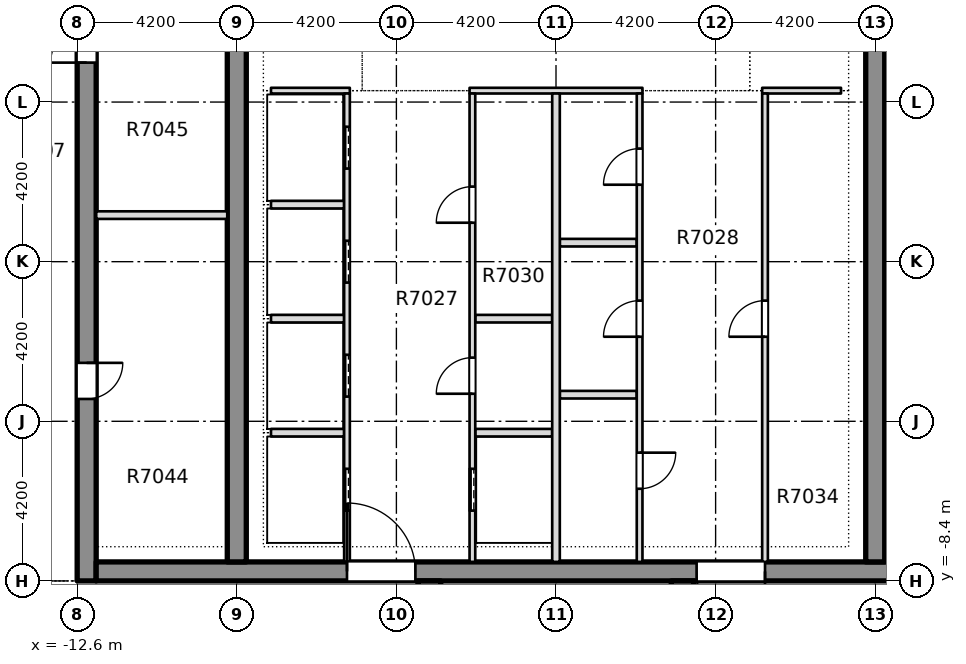
"""IFC4 building model, lengths in metres.
Left out: names, types, materials, properties, quantities, classifications, styles, units other than length and angle.
Written with IfcOpenShell. Run it as: python <this file> out.ifc"""

import sys

from ifc_helpers import new_model, si_unit, direction, frame, frame_2d, origin, place, context, subcontext, project, spatial, rectangle, extrude, element, fill, save


model = new_model("IFC4")
c1 = context("Model", 3, precision=1e-05, world=origin(), true_north=direction((0.0, 1.0)))
c2 = subcontext(c1, "Body", "Model", "MODEL_VIEW")
j1 = project(units=[si_unit("LENGTHUNIT", "METRE"), si_unit("PLANEANGLEUNIT", "RADIAN")], contexts=[c1])
p1 = place(None, origin())
s1 = spatial("IfcSite", under=j1, at=p1, CompositionType="ELEMENT")
p2 = place(p1, origin())
s2 = spatial("IfcBuilding", under=s1, at=p2, CompositionType="ELEMENT")
p3 = place(p2, frame((0.0, 0.0, 264.85)))
s3 = spatial("IfcBuildingStorey", under=s2, at=p3, CompositionType="ELEMENT", Elevation=264.85)
p4 = place(p3, frame((-12.35, -8.4, -0.5), z_axis=(0.0, 0.0, 1.0), x_axis=(0.0, 1.0, 0.0)))
e1 = element("IfcWall", 1, at=p4, inside=s3, PredefinedType="SHEAR", context=c2, shape_type="SweptSolid", body=[
    extrude(rectangle(XDim=30.15, YDim=0.5, at=frame_2d((15.075, 0.0))), origin(), (0.0, 0.0, 1.0), 4.5),
])
p5 = place(p4, frame((4.788, 0.0, 0.5)))
e2 = element("IfcOpeningElement", 2, at=p5, cuts=e1, PredefinedType="OPENING", context=c2, shape_type="SweptSolid", body=[
    extrude(rectangle(XDim=0.95, YDim=2.1, at=frame_2d((0.475, 1.05))), frame((0.0, 0.26, 0.0), z_axis=(0.0, -1.0, 0.0), x_axis=(1.0, 0.0, 0.0)), (0.0, 0.0, 1.0), 0.52),
])
p6 = place(p4, frame((13.638, 0.0, 0.5)))
e3 = element("IfcOpeningElement", 3, at=p6, cuts=e1, PredefinedType="OPENING", context=c2, shape_type="SweptSolid", body=[
    extrude(rectangle(XDim=0.95, YDim=2.1, at=frame_2d((0.475, 1.05))), frame((0.0, 0.26, 0.0), z_axis=(0.0, -1.0, 0.0), x_axis=(1.0, 0.0, 0.0)), (0.0, 0.0, 1.0), 0.52),
])
p7 = place(p4, frame((21.771, 0.0, 0.5)))
e4 = element("IfcOpeningElement", 4, at=p7, cuts=e1, PredefinedType="OPENING", context=c2, shape_type="SweptSolid", body=[
    extrude(rectangle(XDim=0.95, YDim=2.1, at=frame_2d((0.475, 1.05))), frame((0.0, 0.26, 0.0), z_axis=(0.0, -1.0, 0.0), x_axis=(1.0, 0.0, 0.0)), (0.0, 0.0, 1.0), 0.52),
])
p8 = place(p4, frame((24.576, 0.0, 0.5)))
e5 = element("IfcOpeningElement", 5, at=p8, cuts=e1, PredefinedType="OPENING", context=c2, shape_type="SweptSolid", body=[
    extrude(rectangle(XDim=0.95, YDim=2.1, at=frame_2d((0.475, 1.05))), frame((0.0, 0.26, 0.0), z_axis=(0.0, -1.0, 0.0), x_axis=(1.0, 0.0, 0.0)), (0.0, 0.0, 1.0), 0.52),
])
p9 = place(p4, frame((27.555, 0.0, 0.5)))
e6 = element("IfcOpeningElement", 6, at=p9, cuts=e1, PredefinedType="OPENING", context=c2, shape_type="SweptSolid", body=[
    extrude(rectangle(XDim=0.95, YDim=2.1, at=frame_2d((0.475, 1.05))), frame((0.0, 0.26, 0.0), z_axis=(0.0, -1.0, 0.0), x_axis=(1.0, 0.0, 0.0)), (0.0, 0.0, 1.0), 0.52),
])
p10 = place(p4, frame((19.3, 0.0, 0.5)))
e7 = element("IfcOpeningElement", 7, at=p10, cuts=e1, PredefinedType="OPENING", context=c2, shape_type="SweptSolid", body=[
    extrude(rectangle(XDim=1.2, YDim=2.1, at=frame_2d((0.6, 1.05))), frame((0.0, 0.26, 0.0), z_axis=(0.0, -1.0, 0.0), x_axis=(1.0, 0.0, 0.0)), (0.0, 0.0, 1.0), 0.52),
])
p11 = place(p3, frame((-12.1, -8.15, -0.5), z_axis=(0.0, 0.0, 1.0), x_axis=(1.0, 0.0, 0.0)))
e8 = element("IfcWall", 8, at=p11, inside=s3, PredefinedType="SHEAR", context=c2, shape_type="SweptSolid", body=[
    extrude(rectangle(XDim=24.2, YDim=0.5, at=frame_2d((12.1, 0.0))), origin(), (0.0, 0.0, 1.0), 4.5),
])
p12 = place(p11, frame((6.6, 0.0, 0.5)))
e9 = element("IfcOpeningElement", 9, at=p12, cuts=e8, PredefinedType="OPENING", context=c2, shape_type="SweptSolid", body=[
    extrude(rectangle(XDim=1.8, YDim=2.1, at=frame_2d((0.9, 1.05))), frame((0.0, 0.26, 0.0), z_axis=(0.0, -1.0, 0.0), x_axis=(1.0, 0.0, 0.0)), (0.0, 0.0, 1.0), 0.52),
])
p13 = place(p11, frame((15.8, 0.0, 0.5)))
e10 = element("IfcOpeningElement", 10, at=p13, cuts=e8, PredefinedType="OPENING", context=c2, shape_type="SweptSolid", body=[
    extrude(rectangle(XDim=1.8, YDim=2.1, at=frame_2d((0.9, 1.05))), frame((0.0, 0.26, 0.0), z_axis=(0.0, -1.0, 0.0), x_axis=(1.0, 0.0, 0.0)), (0.0, 0.0, 1.0), 0.52),
])
p14 = place(p3, frame((-8.4, -7.9, -0.5), z_axis=(0.0, 0.0, 1.0), x_axis=(0.0, 1.0, 0.0)))
e11 = element("IfcWall", 11, at=p14, inside=s3, PredefinedType="SHEAR", context=c2, shape_type="SweptSolid", body=[
    extrude(rectangle(XDim=29.15, YDim=0.5, at=frame_2d((14.575, 0.0))), origin(), (0.0, 0.0, 1.0), 4.5),
])
p15 = place(p14, frame((18.8, 0.0, 0.5)))
e12 = element("IfcOpeningElement", 12, at=p15, cuts=e11, PredefinedType="OPENING", context=c2, shape_type="SweptSolid", body=[
    extrude(rectangle(XDim=1.2, YDim=2.1, at=frame_2d((0.6, 1.05))), frame((0.0, 0.26, 0.0), z_axis=(0.0, -1.0, 0.0), x_axis=(1.0, 0.0, 0.0)), (0.0, 0.0, 1.0), 0.52),
])
p16 = place(p3, frame((8.4, -7.9, -0.5), z_axis=(0.0, 0.0, 1.0), x_axis=(0.0, 1.0, 0.0)))
e13 = element("IfcWall", 13, at=p16, inside=s3, PredefinedType="SHEAR", context=c2, shape_type="SweptSolid", body=[
    extrude(rectangle(XDim=29.15, YDim=0.5, at=frame_2d((14.575, 0.0))), origin(), (0.0, 0.0, 1.0), 4.5),
])
p17 = place(p16, frame((18.8, 0.0, 0.5)))
e14 = element("IfcOpeningElement", 14, at=p17, cuts=e13, PredefinedType="OPENING", context=c2, shape_type="SweptSolid", body=[
    extrude(rectangle(XDim=1.2, YDim=2.1, at=frame_2d((0.6, 1.05))), frame((0.0, 0.26, 0.0), z_axis=(0.0, -1.0, 0.0), x_axis=(1.0, 0.0, 0.0)), (0.0, 0.0, 1.0), 0.52),
])
for number, where, z_axis, x_axis in (
    (15, (-3.333, -13.0, 0.0), (0.0, 0.0, 1.0), (0.0, 1.0, 0.0)),
    (16, (3.333, -13.0, 0.0), (0.0, 0.0, 1.0), (0.0, 1.0, 0.0)),
):
    element("IfcWall", number, at=place(p3, frame(where, z_axis=z_axis, x_axis=x_axis)), inside=s3, PredefinedType="SOLIDWALL", context=c2, shape_type="SweptSolid", body=[
        extrude(rectangle(XDim=4.6, YDim=0.6, at=frame_2d((2.3, 0.0))), origin(), (0.0, 0.0, 1.0), 4.0),
    ])
p18 = place(p3, frame((-7.5, -4.5, 0.0), z_axis=(0.0, 0.0, 1.0), x_axis=(1.0, 0.0, 0.0)))
e17 = element("IfcWall", 17, at=p18, inside=s3, PredefinedType="PARTITIONING", context=c2, shape_type="SweptSolid", body=[
    extrude(rectangle(XDim=1.925, YDim=0.2, at=frame_2d((0.962, 0.0))), origin(), (0.0, 0.0, 1.0), 4.0),
])
for number, where, z_axis, x_axis in (
    (18, (-2.125, -4.5, 0.0), (0.0, 0.0, 1.0), (1.0, 0.0, 0.0)),
    (19, (0.1, -3.5, 0.0), (0.0, 0.0, 1.0), (1.0, 0.0, 0.0)),
):
    element("IfcWall", number, at=place(p3, frame(where, z_axis=z_axis, x_axis=x_axis)), inside=s3, PredefinedType="PARTITIONING", context=c2, shape_type="SweptSolid", body=[
        extrude(rectangle(XDim=2.025, YDim=0.2, at=frame_2d((1.012, 0.0))), origin(), (0.0, 0.0, 1.0), 4.0),
    ])
p19 = place(p3, frame((-7.5, -1.5, 0.0), z_axis=(0.0, 0.0, 1.0), x_axis=(1.0, 0.0, 0.0)))
e20 = element("IfcWall", 20, at=p19, inside=s3, PredefinedType="PARTITIONING", context=c2, shape_type="SweptSolid", body=[
    extrude(rectangle(XDim=1.925, YDim=0.2, at=frame_2d((0.962, 0.0))), origin(), (0.0, 0.0, 1.0), 4.0),
])
for number, where, z_axis, x_axis in (
    (21, (-2.125, -1.5, 0.0), (0.0, 0.0, 1.0), (1.0, 0.0, 0.0)),
    (22, (0.1, 0.5, 0.0), (0.0, 0.0, 1.0), (1.0, 0.0, 0.0)),
):
    element("IfcWall", number, at=place(p3, frame(where, z_axis=z_axis, x_axis=x_axis)), inside=s3, PredefinedType="PARTITIONING", context=c2, shape_type="SweptSolid", body=[
        extrude(rectangle(XDim=2.025, YDim=0.2, at=frame_2d((1.012, 0.0))), origin(), (0.0, 0.0, 1.0), 4.0),
    ])
p20 = place(p3, frame((-7.5, 1.5, 0.0), z_axis=(0.0, 0.0, 1.0), x_axis=(1.0, 0.0, 0.0)))
e23 = element("IfcWall", 23, at=p20, inside=s3, PredefinedType="PARTITIONING", context=c2, shape_type="SweptSolid", body=[
    extrude(rectangle(XDim=1.925, YDim=0.2, at=frame_2d((0.962, 0.0))), origin(), (0.0, 0.0, 1.0), 4.0),
])
p21 = place(p3, frame((-7.5, 4.5, 0.0), z_axis=(0.0, 0.0, 1.0), x_axis=(1.0, 0.0, 0.0)))
e24 = element("IfcWall", 24, at=p21, inside=s3, PredefinedType="PARTITIONING", context=c2, shape_type="SweptSolid", body=[
    extrude(rectangle(XDim=2.075, YDim=0.15, at=frame_2d((1.038, 0.0))), origin(), (0.0, 0.0, 1.0), 2.5),
])
p22 = place(p3, frame((-2.275, 4.5, 0.0), z_axis=(0.0, 0.0, 1.0), x_axis=(1.0, 0.0, 0.0)))
e25 = element("IfcWall", 25, at=p22, inside=s3, PredefinedType="PARTITIONING", context=c2, shape_type="SweptSolid", body=[
    extrude(rectangle(XDim=4.55, YDim=0.15, at=frame_2d((2.275, 0.0))), origin(), (0.0, 0.0, 1.0), 2.5),
])
p23 = place(p3, frame((5.425, 4.5, 0.0), z_axis=(0.0, 0.0, 1.0), x_axis=(1.0, 0.0, 0.0)))
e26 = element("IfcWall", 26, at=p23, inside=s3, PredefinedType="PARTITIONING", context=c2, shape_type="SweptSolid", body=[
    extrude(rectangle(XDim=2.075, YDim=0.15, at=frame_2d((1.038, 0.0))), origin(), (0.0, 0.0, 1.0), 2.5),
])
p24 = place(p3, frame((-5.5, -7.899, 0.0), z_axis=(0.0, 0.0, 1.0), x_axis=(0.0, 1.0, 0.0)))
e27 = element("IfcWall", 27, at=p24, inside=s3, PredefinedType="PARTITIONING", context=c2, shape_type="SweptSolid", body=[
    extrude(rectangle(XDim=12.324, YDim=0.15, at=frame_2d((6.162, 0.0))), origin(), (0.0, 0.0, 1.0), 4.0),
])
p25 = place(p24, frame((1.349, 0.0, 0.0)))
e28 = element("IfcOpeningElement", 28, at=p25, cuts=e27, PredefinedType="OPENING", context=c2, shape_type="SweptSolid", body=[
    extrude(rectangle(XDim=1.1, YDim=2.1, at=frame_2d((0.55, 1.05))), frame((0.0, 0.085, 0.0), z_axis=(0.0, -1.0, 0.0), x_axis=(1.0, 0.0, 0.0)), (0.0, 0.0, 1.0), 0.17),
])
p26 = place(p24, frame((4.349, 0.0, 0.0)))
e29 = element("IfcOpeningElement", 29, at=p26, cuts=e27, PredefinedType="OPENING", context=c2, shape_type="SweptSolid", body=[
    extrude(rectangle(XDim=1.1, YDim=2.1, at=frame_2d((0.55, 1.05))), frame((0.0, 0.085, 0.0), z_axis=(0.0, -1.0, 0.0), x_axis=(1.0, 0.0, 0.0)), (0.0, 0.0, 1.0), 0.17),
])
p27 = place(p24, frame((7.349, 0.0, 0.0)))
e30 = element("IfcOpeningElement", 30, at=p27, cuts=e27, PredefinedType="OPENING", context=c2, shape_type="SweptSolid", body=[
    extrude(rectangle(XDim=1.1, YDim=2.1, at=frame_2d((0.55, 1.05))), frame((0.0, 0.085, 0.0), z_axis=(0.0, -1.0, 0.0), x_axis=(1.0, 0.0, 0.0)), (0.0, 0.0, 1.0), 0.17),
])
p28 = place(p24, frame((10.349, 0.0, 0.0)))
e31 = element("IfcOpeningElement", 31, at=p28, cuts=e27, PredefinedType="OPENING", context=c2, shape_type="SweptSolid", body=[
    extrude(rectangle(XDim=1.1, YDim=2.1, at=frame_2d((0.55, 1.05))), frame((0.0, 0.085, 0.0), z_axis=(0.0, -1.0, 0.0), x_axis=(1.0, 0.0, 0.0)), (0.0, 0.0, 1.0), 0.17),
])
p29 = place(p3, frame((-2.2, -7.899, 0.0), z_axis=(0.0, 0.0, 1.0), x_axis=(0.0, 1.0, 0.0)))
e32 = element("IfcWall", 32, at=p29, inside=s3, PredefinedType="PARTITIONING", context=c2, shape_type="SweptSolid", body=[
    extrude(rectangle(XDim=12.324, YDim=0.15, at=frame_2d((6.162, 0.0))), origin(), (0.0, 0.0, 1.0), 4.0),
])
p30 = place(p29, frame((1.349, 0.0, 0.0)))
e33 = element("IfcOpeningElement", 33, at=p30, cuts=e32, PredefinedType="OPENING", context=c2, shape_type="SweptSolid", body=[
    extrude(rectangle(XDim=1.1, YDim=2.1, at=frame_2d((0.55, 1.05))), frame((0.0, 0.085, 0.0), z_axis=(0.0, -1.0, 0.0), x_axis=(1.0, 0.0, 0.0)), (0.0, 0.0, 1.0), 0.17),
])
p31 = place(p29, frame((4.424, 0.0, 0.0)))
e34 = element("IfcOpeningElement", 34, at=p31, cuts=e32, PredefinedType="OPENING", context=c2, shape_type="SweptSolid", body=[
    extrude(rectangle(XDim=0.95, YDim=2.1, at=frame_2d((0.475, 1.05))), frame((0.0, 0.085, 0.0), z_axis=(0.0, -1.0, 0.0), x_axis=(1.0, 0.0, 0.0)), (0.0, 0.0, 1.0), 0.17),
])
p32 = place(p29, frame((8.924, 0.0, 0.0)))
e35 = element("IfcOpeningElement", 35, at=p32, cuts=e32, PredefinedType="OPENING", context=c2, shape_type="SweptSolid", body=[
    extrude(rectangle(XDim=0.95, YDim=2.1, at=frame_2d((0.475, 1.05))), frame((0.0, 0.085, 0.0), z_axis=(0.0, -1.0, 0.0), x_axis=(1.0, 0.0, 0.0)), (0.0, 0.0, 1.0), 0.17),
])
p33 = place(p3, frame((0.0, -7.899, 0.0), z_axis=(0.0, 0.0, 1.0), x_axis=(0.0, 1.0, 0.0)))
e36 = element("IfcWall", 36, at=p33, inside=s3, PredefinedType="PARTITIONING", context=c2, shape_type="SweptSolid", body=[
    extrude(rectangle(XDim=12.324, YDim=0.2, at=frame_2d((6.162, 0.0))), origin(), (0.0, 0.0, 1.0), 4.0),
])
p34 = place(p3, frame((2.2, -7.899, 0.0), z_axis=(0.0, 0.0, 1.0), x_axis=(0.0, 1.0, 0.0)))
e37 = element("IfcWall", 37, at=p34, inside=s3, PredefinedType="PARTITIONING", context=c2, shape_type="SweptSolid", body=[
    extrude(rectangle(XDim=12.324, YDim=0.15, at=frame_2d((6.162, 0.0))), origin(), (0.0, 0.0, 1.0), 4.0),
])
p35 = place(p34, frame((1.924, 0.0, 0.0)))
e38 = element("IfcOpeningElement", 38, at=p35, cuts=e37, PredefinedType="OPENING", context=c2, shape_type="SweptSolid", body=[
    extrude(rectangle(XDim=0.95, YDim=2.1, at=frame_2d((0.475, 1.05))), frame((0.0, 0.085, 0.0), z_axis=(0.0, -1.0, 0.0), x_axis=(1.0, 0.0, 0.0)), (0.0, 0.0, 1.0), 0.17),
])
p36 = place(p34, frame((5.924, 0.0, 0.0)))
e39 = element("IfcOpeningElement", 39, at=p36, cuts=e37, PredefinedType="OPENING", context=c2, shape_type="SweptSolid", body=[
    extrude(rectangle(XDim=0.95, YDim=2.1, at=frame_2d((0.475, 1.05))), frame((0.0, 0.085, 0.0), z_axis=(0.0, -1.0, 0.0), x_axis=(1.0, 0.0, 0.0)), (0.0, 0.0, 1.0), 0.17),
])
p37 = place(p34, frame((9.924, 0.0, 0.0)))
e40 = element("IfcOpeningElement", 40, at=p37, cuts=e37, PredefinedType="OPENING", context=c2, shape_type="SweptSolid", body=[
    extrude(rectangle(XDim=0.95, YDim=2.1, at=frame_2d((0.475, 1.05))), frame((0.0, 0.085, 0.0), z_axis=(0.0, -1.0, 0.0), x_axis=(1.0, 0.0, 0.0)), (0.0, 0.0, 1.0), 0.17),
])
p38 = place(p3, frame((5.5, -7.899, 0.0), z_axis=(0.0, 0.0, 1.0), x_axis=(0.0, 1.0, 0.0)))
e41 = element("IfcWall", 41, at=p38, inside=s3, PredefinedType="PARTITIONING", context=c2, shape_type="SweptSolid", body=[
    extrude(rectangle(XDim=12.324, YDim=0.15, at=frame_2d((6.162, 0.0))), origin(), (0.0, 0.0, 1.0), 4.0),
])
p39 = place(p38, frame((5.924, 0.0, 0.0)))
e42 = element("IfcOpeningElement", 42, at=p39, cuts=e41, PredefinedType="OPENING", context=c2, shape_type="SweptSolid", body=[
    extrude(rectangle(XDim=0.95, YDim=2.1, at=frame_2d((0.475, 1.05))), frame((0.0, 0.085, 0.0), z_axis=(0.0, -1.0, 0.0), x_axis=(1.0, 0.0, 0.0)), (0.0, 0.0, 1.0), 0.17),
])
for number, where, z_axis, x_axis in (
    (43, (-12.099, 1.225, 0.0), (0.0, 0.0, 1.0), (1.0, 0.0, 0.0)),
    (44, (8.651, -1.519, 0.0), (0.0, 0.0, 1.0), (1.0, 0.0, 0.0)),
    (45, (8.651, 1.533, 0.0), (0.0, 0.0, 1.0), (1.0, 0.0, 0.0)),
):
    element("IfcWall", number, at=place(p3, frame(where, z_axis=z_axis, x_axis=x_axis)), inside=s3, PredefinedType="PARTITIONING", context=c2, shape_type="SweptSolid", body=[
        extrude(rectangle(XDim=3.448, YDim=0.2, at=frame_2d((1.724, 0.0))), origin(), (0.0, 0.0, 1.0), 4.0),
    ])
p40 = place(p25, origin())
e46 = element("IfcDoor", 46, at=p40, inside=s3, OperationType="SLIDING_TO_LEFT", PredefinedType="DOOR", context=c2, shape_type="SweptSolid", body=[
    extrude(rectangle(XDim=1.1, YDim=2.1, at=frame_2d((0.55, 1.05))), frame((0.0, 0.025, 0.0), z_axis=(0.0, -1.0, 0.0), x_axis=(1.0, 0.0, 0.0)), (0.0, 0.0, 1.0), 0.05),
])
fill(e28, e46)
p41 = place(p26, origin())
e47 = element("IfcDoor", 47, at=p41, inside=s3, OperationType="SLIDING_TO_LEFT", PredefinedType="DOOR", context=c2, shape_type="SweptSolid", body=[
    extrude(rectangle(XDim=1.1, YDim=2.1, at=frame_2d((0.55, 1.05))), frame((0.0, 0.025, 0.0), z_axis=(0.0, -1.0, 0.0), x_axis=(1.0, 0.0, 0.0)), (0.0, 0.0, 1.0), 0.05),
])
fill(e29, e47)
p42 = place(p27, origin())
e48 = element("IfcDoor", 48, at=p42, inside=s3, OperationType="SLIDING_TO_LEFT", PredefinedType="DOOR", context=c2, shape_type="SweptSolid", body=[
    extrude(rectangle(XDim=1.1, YDim=2.1, at=frame_2d((0.55, 1.05))), frame((0.0, 0.025, 0.0), z_axis=(0.0, -1.0, 0.0), x_axis=(1.0, 0.0, 0.0)), (0.0, 0.0, 1.0), 0.05),
])
fill(e30, e48)
p43 = place(p28, origin())
e49 = element("IfcDoor", 49, at=p43, inside=s3, OperationType="SLIDING_TO_LEFT", PredefinedType="DOOR", context=c2, shape_type="SweptSolid", body=[
    extrude(rectangle(XDim=1.1, YDim=2.1, at=frame_2d((0.55, 1.05))), frame((0.0, 0.025, 0.0), z_axis=(0.0, -1.0, 0.0), x_axis=(1.0, 0.0, 0.0)), (0.0, 0.0, 1.0), 0.05),
])
fill(e31, e49)
p44 = place(p30, origin())
e50 = element("IfcDoor", 50, at=p44, inside=s3, OperationType="SLIDING_TO_LEFT", PredefinedType="DOOR", context=c2, shape_type="SweptSolid", body=[
    extrude(rectangle(XDim=1.1, YDim=2.1, at=frame_2d((0.55, 1.05))), frame((0.0, 0.025, 0.0), z_axis=(0.0, -1.0, 0.0), x_axis=(1.0, 0.0, 0.0)), (0.0, 0.0, 1.0), 0.05),
])
fill(e33, e50)
p45 = place(p31, origin())
e51 = element("IfcDoor", 51, at=p45, inside=s3, OperationType="SINGLE_SWING_RIGHT", PredefinedType="DOOR", context=c2, shape_type="SweptSolid", body=[
    extrude(rectangle(XDim=0.95, YDim=2.1, at=frame_2d((0.475, 1.05))), frame((0.0, 0.025, 0.0), z_axis=(0.0, -1.0, 0.0), x_axis=(1.0, 0.0, 0.0)), (0.0, 0.0, 1.0), 0.05),
])
fill(e34, e51)
p46 = place(p32, origin())
e52 = element("IfcDoor", 52, at=p46, inside=s3, OperationType="SINGLE_SWING_LEFT", PredefinedType="DOOR", context=c2, shape_type="SweptSolid", body=[
    extrude(rectangle(XDim=0.95, YDim=2.1, at=frame_2d((0.475, 1.05))), frame((0.0, 0.025, 0.0), z_axis=(0.0, -1.0, 0.0), x_axis=(1.0, 0.0, 0.0)), (0.0, 0.0, 1.0), 0.05),
])
fill(e35, e52)
p47 = place(p35, origin())
e53 = element("IfcDoor", 53, at=p47, inside=s3, OperationType="SINGLE_SWING_RIGHT", PredefinedType="DOOR", context=c2, shape_type="SweptSolid", body=[
    extrude(rectangle(XDim=0.95, YDim=2.1, at=frame_2d((0.475, 1.05))), frame((0.0, 0.025, 0.0), z_axis=(0.0, -1.0, 0.0), x_axis=(1.0, 0.0, 0.0)), (0.0, 0.0, 1.0), 0.05),
])
fill(e38, e53)
p48 = place(p36, origin())
e54 = element("IfcDoor", 54, at=p48, inside=s3, OperationType="SINGLE_SWING_RIGHT", PredefinedType="DOOR", context=c2, shape_type="SweptSolid", body=[
    extrude(rectangle(XDim=0.95, YDim=2.1, at=frame_2d((0.475, 1.05))), frame((0.0, 0.025, 0.0), z_axis=(0.0, -1.0, 0.0), x_axis=(1.0, 0.0, 0.0)), (0.0, 0.0, 1.0), 0.05),
])
fill(e39, e54)
p49 = place(p37, origin())
e55 = element("IfcDoor", 55, at=p49, inside=s3, OperationType="SINGLE_SWING_LEFT", PredefinedType="DOOR", context=c2, shape_type="SweptSolid", body=[
    extrude(rectangle(XDim=0.95, YDim=2.1, at=frame_2d((0.475, 1.05))), frame((0.0, 0.025, 0.0), z_axis=(0.0, -1.0, 0.0), x_axis=(1.0, 0.0, 0.0)), (0.0, 0.0, 1.0), 0.05),
])
fill(e40, e55)
p50 = place(p39, origin())
e56 = element("IfcDoor", 56, at=p50, inside=s3, OperationType="SINGLE_SWING_LEFT", PredefinedType="DOOR", context=c2, shape_type="SweptSolid", body=[
    extrude(rectangle(XDim=0.95, YDim=2.1, at=frame_2d((0.475, 1.05))), frame((0.0, 0.025, 0.0), z_axis=(0.0, -1.0, 0.0), x_axis=(1.0, 0.0, 0.0)), (0.0, 0.0, 1.0), 0.05),
])
fill(e42, e56)
p51 = place(p12, origin())
e57 = element("IfcDoor", 57, at=p51, inside=s3, OperationType="SINGLE_SWING_LEFT", PredefinedType="DOOR", context=c2, shape_type="SweptSolid", body=[
    extrude(rectangle(XDim=1.8, YDim=2.1, at=frame_2d((0.9, 1.05))), frame((0.0, 0.025, 0.0), z_axis=(0.0, -1.0, 0.0), x_axis=(1.0, 0.0, 0.0)), (0.0, 0.0, 1.0), 0.05),
])
fill(e9, e57)
p52 = place(p13, origin())
e58 = element("IfcDoor", 58, at=p52, inside=s3, OperationType="SINGLE_SWING_LEFT", PredefinedType="DOOR", context=c2, shape_type="SweptSolid", body=[
    extrude(rectangle(XDim=1.8, YDim=2.1, at=frame_2d((0.9, 1.05))), frame((0.0, 0.025, 0.0), z_axis=(0.0, -1.0, 0.0), x_axis=(1.0, 0.0, 0.0)), (0.0, 0.0, 1.0), 0.05),
])
fill(e10, e58)
p53 = place(p5, origin())
e59 = element("IfcDoor", 59, at=p53, inside=s3, OperationType="SINGLE_SWING_LEFT", PredefinedType="DOOR", context=c2, shape_type="SweptSolid", body=[
    extrude(rectangle(XDim=0.95, YDim=2.1, at=frame_2d((0.475, 1.05))), frame((0.0, 0.025, 0.0), z_axis=(0.0, -1.0, 0.0), x_axis=(1.0, 0.0, 0.0)), (0.0, 0.0, 1.0), 0.05),
])
fill(e2, e59)
p54 = place(p6, origin())
e60 = element("IfcDoor", 60, at=p54, inside=s3, OperationType="SINGLE_SWING_LEFT", PredefinedType="DOOR", context=c2, shape_type="SweptSolid", body=[
    extrude(rectangle(XDim=0.95, YDim=2.1, at=frame_2d((0.475, 1.05))), frame((0.0, 0.025, 0.0), z_axis=(0.0, -1.0, 0.0), x_axis=(1.0, 0.0, 0.0)), (0.0, 0.0, 1.0), 0.05),
])
fill(e3, e60)
save(model, sys.argv[1])
